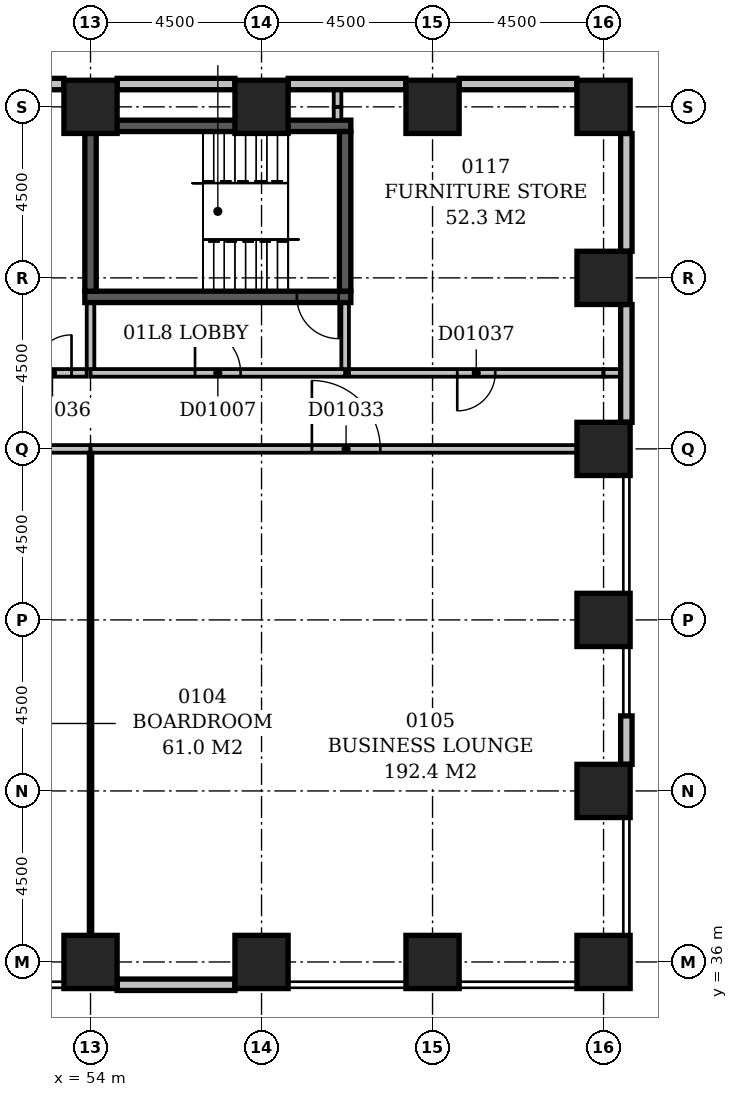
"""IFC4 building model, lengths in metres.
Left out: names, types, materials, properties, quantities, classifications, styles, units other than length and angle.
Written with IfcOpenShell. Run it as: python <this file> out.ifc"""

import sys

from ifc_helpers import new_model, si_unit, direction, frame, frame_2d, origin, origin_2d, place, context, subcontext, project, spatial, rectangle, extrude, element, fill, save


model = new_model("IFC4")
c1 = context("Model", 3, precision=1e-05, world=origin(), true_north=direction((0.0, 1.0)))
c2 = subcontext(c1, "Body", "Model", "MODEL_VIEW")
j1 = project(units=[si_unit("LENGTHUNIT", "METRE"), si_unit("PLANEANGLEUNIT", "RADIAN")], contexts=[c1])
p1 = place(None, origin())
s1 = spatial("IfcSite", under=j1, at=p1, CompositionType="ELEMENT")
p2 = place(p1, origin())
s2 = spatial("IfcBuilding", under=s1, at=p2, CompositionType="ELEMENT")
p3 = place(p2, frame((0.0, 0.0, 9.0)))
s3 = spatial("IfcBuildingStorey", under=s2, at=p3, CompositionType="ELEMENT", Elevation=9.0)
p4 = place(p3, frame((53.85, 53.5, -0.6), z_axis=(0.0, 0.0, 1.0), x_axis=(1.0, 0.0, 0.0)))
e1 = element("IfcWall", 1, at=p4, inside=s3, PredefinedType="SHEAR", context=c2, shape_type="SweptSolid", body=[
    extrude(rectangle(XDim=7.0, YDim=0.3, at=frame_2d((3.5, 0.0))), origin(), (0.0, 0.0, 1.0), 5.2),
])
p5 = place(p4, frame((5.58, 0.0, 0.6)))
e2 = element("IfcOpeningElement", 2, at=p5, cuts=e1, PredefinedType="OPENING", context=c2, shape_type="SweptSolid", body=[
    extrude(rectangle(XDim=1.1, YDim=2.1, at=frame_2d((0.55, 1.05))), frame((0.0, 0.162, 0.0), z_axis=(0.0, -1.0, 0.0), x_axis=(1.0, 0.0, 0.0)), (0.0, 0.0, 1.0), 0.324),
])
p6 = place(p3, frame((53.85, 58.0, -0.6), z_axis=(0.0, 0.0, 1.0), x_axis=(1.0, 0.0, 0.0)))
e3 = element("IfcWall", 3, at=p6, inside=s3, PredefinedType="SHEAR", context=c2, shape_type="SweptSolid", body=[
    extrude(rectangle(XDim=7.0, YDim=0.3, at=frame_2d((3.5, 0.0))), origin(), (0.0, 0.0, 1.0), 5.2),
])
for number, where, z_axis, x_axis in (
    (4, (54.0, 53.65, -0.6), (0.0, 0.0, 1.0), (0.0, 1.0, 0.0)),
    (5, (60.7, 53.65, -0.6), (0.0, 0.0, 1.0), (0.0, 1.0, 0.0)),
):
    element("IfcWall", number, at=place(p3, frame(where, z_axis=z_axis, x_axis=x_axis)), inside=s3, PredefinedType="SHEAR", context=c2, shape_type="SweptSolid", body=[
        extrude(rectangle(XDim=4.2, YDim=0.3, at=frame_2d((2.1, 0.0))), origin(), (0.0, 0.0, 1.0), 5.2),
    ])
for number, where, z_axis, x_axis in (
    (6, (54.0, 36.0, -0.6), (0.0, 0.0, 1.0), (1.0, 0.0, 0.0)),
    (7, (58.5, 36.0, -0.6), (0.0, 0.0, 1.0), (1.0, 0.0, 0.0)),
    (8, (63.0, 36.0, -0.6), (0.0, 0.0, 1.0), (1.0, 0.0, 0.0)),
    (9, (67.5, 36.0, -0.6), (0.0, 0.0, 1.0), (1.0, 0.0, 0.0)),
    (10, (67.5, 40.5, -0.6), (0.0, 0.0, 1.0), (1.0, 0.0, 0.0)),
    (11, (67.5, 45.0, -0.6), (0.0, 0.0, 1.0), (1.0, 0.0, 0.0)),
    (12, (67.5, 49.5, -0.6), (0.0, 0.0, 1.0), (1.0, 0.0, 0.0)),
    (13, (67.5, 54.0, -0.6), (0.0, 0.0, 1.0), (1.0, 0.0, 0.0)),
    (14, (54.0, 58.5, -0.6), (0.0, 0.0, 1.0), (1.0, 0.0, 0.0)),
    (15, (58.5, 58.5, -0.6), (0.0, 0.0, 1.0), (1.0, 0.0, 0.0)),
    (16, (63.0, 58.5, -0.6), (0.0, 0.0, 1.0), (1.0, 0.0, 0.0)),
    (17, (67.5, 58.5, -0.6), (0.0, 0.0, 1.0), (1.0, 0.0, 0.0)),
):
    element("IfcColumn", number, at=place(p3, frame(where, z_axis=z_axis, x_axis=x_axis)), inside=s3, PredefinedType="COLUMN", context=c2, shape_type="SweptSolid", body=[
        extrude(rectangle(XDim=1.4, YDim=1.4, at=origin_2d()), origin(), (0.0, 0.0, 1.0), 5.2),
    ])
p7 = place(p3, frame((54.7, 35.4, 0.0), z_axis=(0.0, 0.0, 1.0), x_axis=(1.0, 0.0, 0.0)))
e18 = element("IfcWall", 18, at=p7, inside=s3, PredefinedType="STANDARD", context=c2, shape_type="SweptSolid", body=[
    extrude(rectangle(XDim=3.1, YDim=0.3, at=frame_2d((1.55, 0.0))), origin(), (0.0, 0.0, 1.0), 3.9),
])
p8 = place(p3, frame((68.1, 41.2, 0.0), z_axis=(0.0, 0.0, 1.0), x_axis=(0.0, 1.0, 0.0)))
e19 = element("IfcWall", 19, at=p8, inside=s3, PredefinedType="STANDARD", context=c2, shape_type="SweptSolid", body=[
    extrude(rectangle(XDim=1.275, YDim=0.3, at=frame_2d((0.638, 0.0))), origin(), (0.0, 0.0, 1.0), 3.9),
])
for number, where, z_axis, x_axis in (
    (20, (68.1, 50.2, 0.0), (0.0, 0.0, 1.0), (0.0, 1.0, 0.0)),
    (21, (68.1, 54.7, 0.0), (0.0, 0.0, 1.0), (0.0, 1.0, 0.0)),
    (22, (66.8, 59.1, 0.0), (0.0, 0.0, 1.0), (-1.0, 0.0, 0.0)),
    (23, (62.3, 59.1, 0.0), (0.0, 0.0, 1.0), (-1.0, 0.0, 0.0)),
    (24, (57.8, 59.1, 0.0), (0.0, 0.0, 1.0), (-1.0, 0.0, 0.0)),
    (25, (53.3, 59.1, 0.0), (0.0, 0.0, 1.0), (-1.0, 0.0, 0.0)),
):
    element("IfcWall", number, at=place(p3, frame(where, z_axis=z_axis, x_axis=x_axis)), inside=s3, PredefinedType="STANDARD", context=c2, shape_type="SweptSolid", body=[
        extrude(rectangle(XDim=3.1, YDim=0.3, at=frame_2d((1.55, 0.0))), origin(), (0.0, 0.0, 1.0), 3.9),
    ])
p9 = place(p3, frame((54.0, 51.5, 0.0), z_axis=(0.0, 0.0, 1.0), x_axis=(1.0, 0.0, 0.0)))
e26 = element("IfcWall", 26, at=p9, inside=s3, PredefinedType="PARTITIONING", context=c2, shape_type="SweptSolid", body=[
    extrude(rectangle(XDim=6.7, YDim=0.2, at=frame_2d((3.35, 0.0))), origin(), (0.0, 0.0, 1.0), 4.6),
])
p10 = place(p9, frame((2.75, 0.0, 0.0)))
e27 = element("IfcOpeningElement", 27, at=p10, cuts=e26, PredefinedType="OPENING", context=c2, shape_type="SweptSolid", body=[
    extrude(rectangle(XDim=1.2, YDim=2.1, at=frame_2d((0.6, 1.05))), frame((0.0, 0.112, 0.0), z_axis=(0.0, -1.0, 0.0), x_axis=(1.0, 0.0, 0.0)), (0.0, 0.0, 1.0), 0.224),
])
p11 = place(p3, frame((60.7, 51.6, 0.0), z_axis=(0.0, 0.0, 1.0), x_axis=(0.0, 1.0, 0.0)))
e28 = element("IfcWall", 28, at=p11, inside=s3, PredefinedType="PARTITIONING", context=c2, shape_type="SweptSolid", body=[
    extrude(rectangle(XDim=1.73, YDim=0.2, at=frame_2d((0.865, 0.0))), origin(), (0.0, 0.0, 1.0), 4.6),
])
p12 = place(p3, frame((54.0, 51.6, 0.0), z_axis=(0.0, 0.0, 1.0), x_axis=(0.0, 1.0, 0.0)))
e29 = element("IfcWall", 29, at=p12, inside=s3, PredefinedType="PARTITIONING", context=c2, shape_type="SweptSolid", body=[
    extrude(rectangle(XDim=1.73, YDim=0.2, at=frame_2d((0.865, 0.0))), origin(), (0.0, 0.0, 1.0), 3.9),
])
p13 = place(p3, frame((49.5, 49.5, 0.0), z_axis=(0.0, 0.0, 1.0), x_axis=(1.0, 0.0, 0.0)))
e30 = element("IfcWall", 30, at=p13, inside=s3, PredefinedType="PARTITIONING", context=c2, shape_type="SweptSolid", body=[
    extrude(rectangle(XDim=4.5, YDim=0.2, at=frame_2d((2.25, 0.0))), origin(), (0.0, 0.0, 1.0), 4.6),
])
p14 = place(p13, frame((1.8, 0.0, 0.0)))
e31 = element("IfcOpeningElement", 31, at=p14, cuts=e30, PredefinedType="OPENING", context=c2, shape_type="SweptSolid", body=[
    extrude(rectangle(XDim=0.9, YDim=2.1, at=frame_2d((0.45, 1.05))), frame((0.0, 0.112, 0.0), z_axis=(0.0, -1.0, 0.0), x_axis=(1.0, 0.0, 0.0)), (0.0, 0.0, 1.0), 0.224),
])
p15 = place(p3, frame((54.0, 49.4, 0.0), z_axis=(0.0, 0.0, 1.0), x_axis=(0.0, -1.0, 0.0)))
e32 = element("IfcWall", 32, at=p15, inside=s3, PredefinedType="PARTITIONING", context=c2, shape_type="SweptSolid", body=[
    extrude(rectangle(XDim=13.4, YDim=0.1, at=frame_2d((6.7, 0.0))), origin(), (0.0, 0.0, 1.0), 3.9),
])
p16 = place(p3, frame((54.0, 49.5, 0.0), z_axis=(0.0, 0.0, 1.0), x_axis=(1.0, 0.0, 0.0)))
e33 = element("IfcWall", 33, at=p16, inside=s3, PredefinedType="PARTITIONING", context=c2, shape_type="SweptSolid", body=[
    extrude(rectangle(XDim=13.5, YDim=0.2, at=frame_2d((6.75, 0.0))), origin(), (0.0, 0.0, 1.0), 4.6),
])
p17 = place(p16, frame((5.825, 0.0, 0.0)))
e34 = element("IfcOpeningElement", 34, at=p17, cuts=e33, PredefinedType="OPENING", context=c2, shape_type="SweptSolid", body=[
    extrude(rectangle(XDim=1.8, YDim=2.4, at=frame_2d((0.9, 1.2))), frame((0.0, 0.112, 0.0), z_axis=(0.0, -1.0, 0.0), x_axis=(1.0, 0.0, 0.0)), (0.0, 0.0, 1.0), 0.224),
])
p18 = place(p3, frame((53.9, 51.5, 0.0), z_axis=(0.0, 0.0, 1.0), x_axis=(-1.0, 0.0, 0.0)))
e35 = element("IfcWall", 35, at=p18, inside=s3, PredefinedType="PARTITIONING", context=c2, shape_type="SweptSolid", body=[
    extrude(rectangle(XDim=1.8, YDim=0.2, at=frame_2d((0.9, 0.0))), origin(), (0.0, 0.0, 1.0), 4.6),
])
p19 = place(p18, frame((0.4, 0.0, 0.0)))
e36 = element("IfcOpeningElement", 36, at=p19, cuts=e35, PredefinedType="OPENING", context=c2, shape_type="SweptSolid", body=[
    extrude(rectangle(XDim=1.0, YDim=2.1, at=frame_2d((0.5, 1.05))), frame((0.0, 0.112, 0.0), z_axis=(0.0, -1.0, 0.0), x_axis=(1.0, 0.0, 0.0)), (0.0, 0.0, 1.0), 0.224),
])
p20 = place(p3, frame((67.5, 51.5, 0.0), z_axis=(0.0, 0.0, 1.0), x_axis=(-1.0, 0.0, 0.0)))
e37 = element("IfcWall", 37, at=p20, inside=s3, PredefinedType="PARTITIONING", context=c2, shape_type="SweptSolid", body=[
    extrude(rectangle(XDim=6.7, YDim=0.2, at=frame_2d((3.35, 0.0))), origin(), (0.0, 0.0, 1.0), 4.6),
])
p21 = place(p20, frame((2.85, 0.0, 0.0)))
e38 = element("IfcOpeningElement", 38, at=p21, cuts=e37, PredefinedType="OPENING", context=c2, shape_type="SweptSolid", body=[
    extrude(rectangle(XDim=1.0, YDim=2.1, at=frame_2d((0.5, 1.05))), frame((0.0, 0.112, 0.0), z_axis=(0.0, -1.0, 0.0), x_axis=(1.0, 0.0, 0.0)), (0.0, 0.0, 1.0), 0.224),
])
p22 = place(p3, frame((67.95, 51.5, 0.0), z_axis=(0.0, 0.0, 1.0), x_axis=(-1.0, 0.0, 0.0)))
e39 = element("IfcWall", 39, at=p22, inside=s3, PredefinedType="PARTITIONING", context=c2, shape_type="SweptSolid", body=[
    extrude(rectangle(XDim=0.45, YDim=0.2, at=frame_2d((0.225, 0.0))), origin(), (0.0, 0.0, 1.0), 4.6),
])
p23 = place(p3, frame((60.5, 58.15, 0.0), z_axis=(0.0, 0.0, 1.0), x_axis=(0.0, 1.0, 0.0)))
e40 = element("IfcWall", 40, at=p23, inside=s3, PredefinedType="PARTITIONING", context=c2, shape_type="SweptSolid", body=[
    extrude(rectangle(XDim=0.35, YDim=0.2, at=frame_2d((0.175, 0.0))), origin(), (0.0, 0.0, 1.0), 4.6),
])
p24 = place(p3, frame((60.5, 58.5, 0.0), z_axis=(0.0, 0.0, 1.0), x_axis=(0.0, 1.0, 0.0)))
e41 = element("IfcWall", 41, at=p24, inside=s3, PredefinedType="PARTITIONING", context=c2, shape_type="SweptSolid", body=[
    extrude(rectangle(XDim=0.45, YDim=0.2, at=frame_2d((0.225, 0.0))), origin(), (0.0, 0.0, 1.0), 4.6),
])
p25 = place(p10, origin())
e42 = element("IfcDoor", 42, at=p25, inside=s3, OperationType="SINGLE_SWING_LEFT", PredefinedType="DOOR", context=c2, shape_type="SweptSolid", body=[
    extrude(rectangle(XDim=1.2, YDim=2.1, at=frame_2d((0.6, 1.05))), frame((0.0, 0.025, 0.0), z_axis=(0.0, -1.0, 0.0), x_axis=(1.0, 0.0, 0.0)), (0.0, 0.0, 1.0), 0.05),
])
fill(e27, e42)
p26 = place(p5, origin())
e43 = element("IfcDoor", 43, at=p26, inside=s3, OperationType="SINGLE_SWING_RIGHT", PredefinedType="DOOR", context=c2, shape_type="SweptSolid", body=[
    extrude(rectangle(XDim=1.1, YDim=2.1, at=frame_2d((0.55, 1.05))), frame((0.0, 0.025, 0.0), z_axis=(0.0, -1.0, 0.0), x_axis=(1.0, 0.0, 0.0)), (0.0, 0.0, 1.0), 0.05),
])
fill(e2, e43)
p27 = place(p17, origin())
e44 = element("IfcDoor", 44, at=p27, inside=s3, OperationType="DOUBLE_DOOR_SINGLE_SWING", PredefinedType="DOOR", context=c2, shape_type="SweptSolid", body=[
    extrude(rectangle(XDim=1.8, YDim=2.4, at=frame_2d((0.9, 1.2))), frame((0.0, 0.025, 0.0), z_axis=(0.0, -1.0, 0.0), x_axis=(1.0, 0.0, 0.0)), (0.0, 0.0, 1.0), 0.05),
])
fill(e34, e44)
p28 = place(p19, frame((1.0, 0.0, 0.0), z_axis=(0.0, 0.0, 1.0), x_axis=(-1.0, 0.0, 0.0)))
e45 = element("IfcDoor", 45, at=p28, inside=s3, OperationType="SINGLE_SWING_RIGHT", PredefinedType="DOOR", context=c2, shape_type="SweptSolid", body=[
    extrude(rectangle(XDim=1.0, YDim=2.1, at=frame_2d((0.5, 1.05))), frame((0.0, 0.025, 0.0), z_axis=(0.0, -1.0, 0.0), x_axis=(1.0, 0.0, 0.0)), (0.0, 0.0, 1.0), 0.05),
])
fill(e36, e45)
p29 = place(p21, frame((1.0, 0.0, 0.0), z_axis=(0.0, 0.0, 1.0), x_axis=(-1.0, 0.0, 0.0)))
e46 = element("IfcDoor", 46, at=p29, inside=s3, OperationType="SINGLE_SWING_LEFT", PredefinedType="DOOR", context=c2, shape_type="SweptSolid", body=[
    extrude(rectangle(XDim=1.0, YDim=2.1, at=frame_2d((0.5, 1.05))), frame((0.0, 0.025, 0.0), z_axis=(0.0, -1.0, 0.0), x_axis=(1.0, 0.0, 0.0)), (0.0, 0.0, 1.0), 0.05),
])
fill(e38, e46)
save(model, sys.argv[1])
